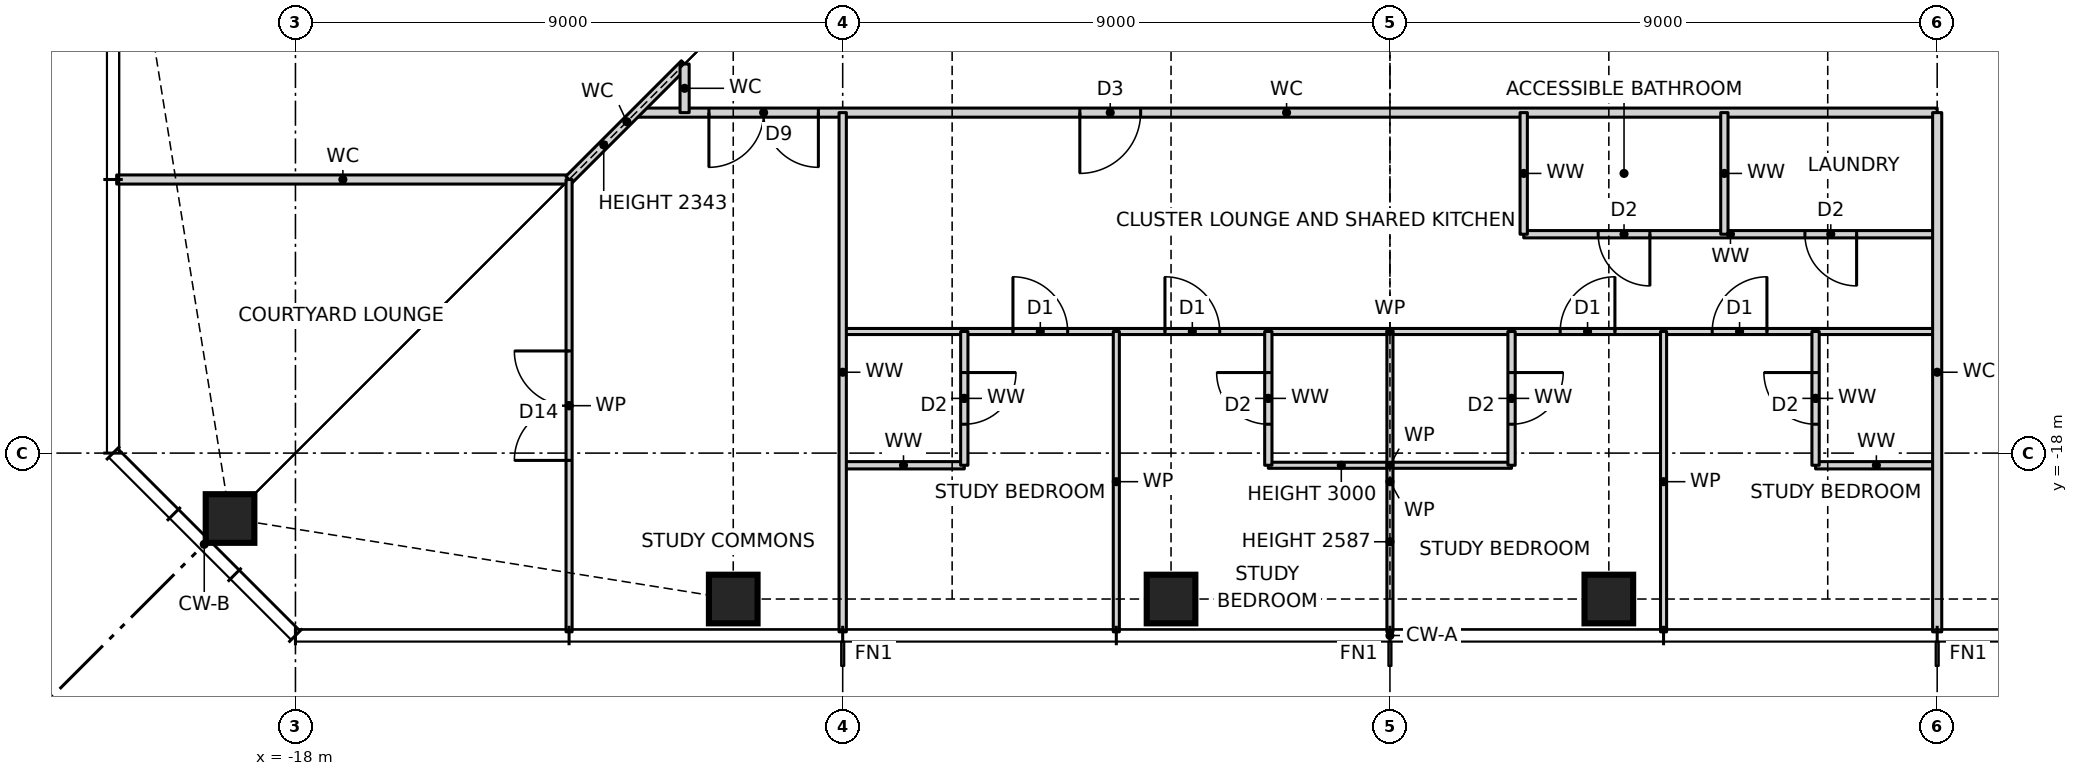
"""IFC4 building model, lengths in metres.
Left out: names, types, materials, properties, quantities, classifications, styles, units other than length and angle.
Written with IfcOpenShell. Run it as: python <this file> out.ifc"""

import sys

from ifc_helpers import new_model, si_unit, direction, frame, frame_2d, origin, origin_2d, place, context, subcontext, project, spatial, rectangle, hollow_rectangle, extrude, element, fill, save


model = new_model("IFC4")
c1 = context("Model", 3, precision=1e-05, world=origin(), true_north=direction((0.0, 1.0)))
c2 = subcontext(c1, "Body", "Model", "MODEL_VIEW")
j1 = project(units=[si_unit("LENGTHUNIT", "METRE"), si_unit("PLANEANGLEUNIT", "RADIAN")], contexts=[c1])
p1 = place(None, origin())
s1 = spatial("IfcSite", under=j1, at=p1, CompositionType="ELEMENT")
p2 = place(p1, origin())
s2 = spatial("IfcBuilding", under=s1, at=p2, CompositionType="ELEMENT")
p3 = place(p2, frame((0.0, 0.0, 84.0)))
s3 = spatial("IfcBuildingStorey", under=s2, at=p3, CompositionType="ELEMENT", Elevation=84.0)
for number, where, z_axis, x_axis in (
    (1, (-19.076, -19.076, 0.0), (0.0, 0.0, 1.0), (1.0, 0.0, 0.0)),
    (2, (-10.8, -20.4, 0.0), (0.0, 0.0, 1.0), (1.0, 0.0, 0.0)),
    (3, (-3.6, -20.4, 0.0), (0.0, 0.0, 1.0), (1.0, 0.0, 0.0)),
    (4, (3.6, -20.4, 0.0), (0.0, 0.0, 1.0), (1.0, 0.0, 0.0)),
):
    element("IfcColumn", number, at=place(p3, frame(where, z_axis=z_axis, x_axis=x_axis)), inside=s3, PredefinedType="COLUMN", context=c2, shape_type="SweptSolid", body=[
        extrude(hollow_rectangle(XDim=0.8, YDim=0.8, WallThickness=0.07, at=origin_2d()), origin(), (0.0, 0.0, 1.0), 3.5),
    ])
p4 = place(p3, frame((-9.0, -18.2, 0.0), z_axis=(0.0, 0.0, 1.0), x_axis=(1.0, 0.0, 0.0)))
e5 = element("IfcWall", 5, at=p4, inside=s3, PredefinedType="PARTITIONING", context=c2, shape_type="SweptSolid", body=[
    extrude(rectangle(XDim=2.0, YDim=0.12, at=frame_2d((1.0, 0.0))), origin(), (0.0, 0.0, 1.0), 3.27),
])
p5 = place(p3, frame((-2.0, -18.2, 0.0), z_axis=(0.0, 0.0, 1.0), x_axis=(1.0, 0.0, 0.0)))
e6 = element("IfcWall", 6, at=p5, inside=s3, PredefinedType="PARTITIONING", context=c2, shape_type="SweptSolid", body=[
    extrude(rectangle(XDim=4.0, YDim=0.1, at=frame_2d((2.0, 0.0))), origin(), (0.0, 0.0, 1.0), 3.0),
])
p6 = place(p3, frame((7.0, -18.2, 0.0), z_axis=(0.0, 0.0, 1.0), x_axis=(1.0, 0.0, 0.0)))
e7 = element("IfcWall", 7, at=p6, inside=s3, PredefinedType="PARTITIONING", context=c2, shape_type="SweptSolid", body=[
    extrude(rectangle(XDim=2.0, YDim=0.12, at=frame_2d((1.0, 0.0))), origin(), (0.0, 0.0, 1.0), 3.27),
])
p7 = place(p3, frame((-9.0, -16.0, 0.0), z_axis=(0.0, 0.0, 1.0), x_axis=(1.0, 0.0, 0.0)))
e8 = element("IfcWall", 8, at=p7, inside=s3, PredefinedType="PARTITIONING", context=c2, shape_type="SweptSolid", body=[
    extrude(rectangle(XDim=18.0, YDim=0.1, at=frame_2d((9.0, 0.0))), origin(), (0.0, 0.0, 1.0), 3.27),
])
p8 = place(p7, frame((2.8, 0.0, 0.0)))
e9 = element("IfcOpeningElement", 9, at=p8, cuts=e8, PredefinedType="OPENING", context=c2, shape_type="SweptSolid", body=[
    extrude(rectangle(XDim=0.9, YDim=2.1, at=frame_2d((0.45, 1.05))), frame((0.0, 0.06, 0.0), z_axis=(0.0, -1.0, 0.0), x_axis=(1.0, 0.0, 0.0)), (0.0, 0.0, 1.0), 0.12),
])
p9 = place(p7, frame((5.3, 0.0, 0.0)))
e10 = element("IfcOpeningElement", 10, at=p9, cuts=e8, PredefinedType="OPENING", context=c2, shape_type="SweptSolid", body=[
    extrude(rectangle(XDim=0.9, YDim=2.1, at=frame_2d((0.45, 1.05))), frame((0.0, 0.06, 0.0), z_axis=(0.0, -1.0, 0.0), x_axis=(1.0, 0.0, 0.0)), (0.0, 0.0, 1.0), 0.12),
])
p10 = place(p7, frame((11.8, 0.0, 0.0)))
e11 = element("IfcOpeningElement", 11, at=p10, cuts=e8, PredefinedType="OPENING", context=c2, shape_type="SweptSolid", body=[
    extrude(rectangle(XDim=0.9, YDim=2.1, at=frame_2d((0.45, 1.05))), frame((0.0, 0.06, 0.0), z_axis=(0.0, -1.0, 0.0), x_axis=(1.0, 0.0, 0.0)), (0.0, 0.0, 1.0), 0.12),
])
p11 = place(p7, frame((14.3, 0.0, 0.0)))
e12 = element("IfcOpeningElement", 12, at=p11, cuts=e8, PredefinedType="OPENING", context=c2, shape_type="SweptSolid", body=[
    extrude(rectangle(XDim=0.9, YDim=2.1, at=frame_2d((0.45, 1.05))), frame((0.0, 0.06, 0.0), z_axis=(0.0, -1.0, 0.0), x_axis=(1.0, 0.0, 0.0)), (0.0, 0.0, 1.0), 0.12),
])
p12 = place(p3, frame((2.2, -14.4, 0.0), z_axis=(0.0, 0.0, 1.0), x_axis=(1.0, 0.0, 0.0)))
e13 = element("IfcWall", 13, at=p12, inside=s3, PredefinedType="PARTITIONING", context=c2, shape_type="SweptSolid", body=[
    extrude(rectangle(XDim=6.8, YDim=0.12, at=frame_2d((3.4, 0.0))), origin(), (0.0, 0.0, 1.0), 3.27),
])
p13 = place(p12, frame((1.225, 0.0, 0.0)))
e14 = element("IfcOpeningElement", 14, at=p13, cuts=e13, PredefinedType="OPENING", context=c2, shape_type="SweptSolid", body=[
    extrude(rectangle(XDim=0.85, YDim=2.1, at=frame_2d((0.425, 1.05))), frame((0.0, 0.07, 0.0), z_axis=(0.0, -1.0, 0.0), x_axis=(1.0, 0.0, 0.0)), (0.0, 0.0, 1.0), 0.14),
])
p14 = place(p12, frame((4.625, 0.0, 0.0)))
e15 = element("IfcOpeningElement", 15, at=p14, cuts=e13, PredefinedType="OPENING", context=c2, shape_type="SweptSolid", body=[
    extrude(rectangle(XDim=0.85, YDim=2.1, at=frame_2d((0.425, 1.05))), frame((0.0, 0.07, 0.0), z_axis=(0.0, -1.0, 0.0), x_axis=(1.0, 0.0, 0.0)), (0.0, 0.0, 1.0), 0.14),
])
p15 = place(p3, frame((-20.94, -13.5, 0.0), z_axis=(0.0, 0.0, 1.0), x_axis=(1.0, 0.0, 0.0)))
e16 = element("IfcWall", 16, at=p15, inside=s3, PredefinedType="PARTITIONING", context=c2, shape_type="SweptSolid", body=[
    extrude(rectangle(XDim=7.44, YDim=0.15, at=frame_2d((3.72, 0.0))), origin(), (0.0, 0.0, 1.0), 3.27),
])
p16 = place(p3, frame((-12.4, -12.4, 0.0), z_axis=(0.0, 0.0, 1.0), x_axis=(1.0, 0.0, 0.0)))
e17 = element("IfcWall", 17, at=p16, inside=s3, PredefinedType="PARTITIONING", context=c2, shape_type="SweptSolid", body=[
    extrude(rectangle(XDim=21.4, YDim=0.15, at=frame_2d((10.7, 0.0))), origin(), (0.0, 0.0, 1.0), 3.27),
])
p17 = place(p16, frame((1.2, 0.0, 0.0)))
e18 = element("IfcOpeningElement", 18, at=p17, cuts=e17, PredefinedType="OPENING", context=c2, shape_type="SweptSolid", body=[
    extrude(rectangle(XDim=1.8, YDim=2.1, at=frame_2d((0.9, 1.05))), frame((0.0, 0.085, 0.0), z_axis=(0.0, -1.0, 0.0), x_axis=(1.0, 0.0, 0.0)), (0.0, 0.0, 1.0), 0.17),
])
p18 = place(p16, frame((7.3, 0.0, 0.0)))
e19 = element("IfcOpeningElement", 19, at=p18, cuts=e17, PredefinedType="OPENING", context=c2, shape_type="SweptSolid", body=[
    extrude(rectangle(XDim=1.0, YDim=2.1, at=frame_2d((0.5, 1.05))), frame((0.0, 0.085, 0.0), z_axis=(0.0, -1.0, 0.0), x_axis=(1.0, 0.0, 0.0)), (0.0, 0.0, 1.0), 0.17),
])
p19 = place(p3, frame((-13.5, -13.5, 0.0), z_axis=(0.0, 0.0, 1.0), x_axis=(0.707106781187, 0.707106781187, 0.0)))
e20 = element("IfcWall", 20, at=p19, inside=s3, PredefinedType="PARTITIONING", context=c2, shape_type="SweptSolid", body=[
    extrude(rectangle(XDim=2.687, YDim=0.15, at=frame_2d((1.343, 0.0))), origin(), (0.0, 0.0, 1.0), 2.343),
])
p20 = place(p3, frame((9.0, -20.94, 0.0), z_axis=(0.0, 0.0, 1.0), x_axis=(0.0, 1.0, 0.0)))
e21 = element("IfcWall", 21, at=p20, inside=s3, PredefinedType="PARTITIONING", context=c2, shape_type="SweptSolid", body=[
    extrude(rectangle(XDim=8.54, YDim=0.15, at=frame_2d((4.27, 0.0))), origin(), (0.0, 0.0, 1.0), 3.27),
])
p21 = place(p3, frame((7.0, -18.2, 0.0), z_axis=(0.0, 0.0, 1.0), x_axis=(0.0, 1.0, 0.0)))
e22 = element("IfcWall", 22, at=p21, inside=s3, PredefinedType="PARTITIONING", context=c2, shape_type="SweptSolid", body=[
    extrude(rectangle(XDim=2.2, YDim=0.12, at=frame_2d((1.1, 0.0))), origin(), (0.0, 0.0, 1.0), 3.27),
])
p22 = place(p21, frame((0.675, 0.0, 0.0)))
e23 = element("IfcOpeningElement", 23, at=p22, cuts=e22, PredefinedType="OPENING", context=c2, shape_type="SweptSolid", body=[
    extrude(rectangle(XDim=0.85, YDim=2.1, at=frame_2d((0.425, 1.05))), frame((0.0, 0.07, 0.0), z_axis=(0.0, -1.0, 0.0), x_axis=(1.0, 0.0, 0.0)), (0.0, 0.0, 1.0), 0.14),
])
p23 = place(p3, frame((5.5, -14.4, 0.0), z_axis=(0.0, 0.0, 1.0), x_axis=(0.0, 1.0, 0.0)))
e24 = element("IfcWall", 24, at=p23, inside=s3, PredefinedType="PARTITIONING", context=c2, shape_type="SweptSolid", body=[
    extrude(rectangle(XDim=2.0, YDim=0.12, at=frame_2d((1.0, 0.0))), origin(), (0.0, 0.0, 1.0), 3.27),
])
p24 = place(p3, frame((4.5, -20.94, 0.0), z_axis=(0.0, 0.0, 1.0), x_axis=(0.0, 1.0, 0.0)))
e25 = element("IfcWall", 25, at=p24, inside=s3, PredefinedType="PARTITIONING", context=c2, shape_type="SweptSolid", body=[
    extrude(rectangle(XDim=4.94, YDim=0.1, at=frame_2d((2.47, 0.0))), origin(), (0.0, 0.0, 1.0), 3.27),
])
p25 = place(p3, frame((2.2, -14.4, 0.0), z_axis=(0.0, 0.0, 1.0), x_axis=(0.0, 1.0, 0.0)))
e26 = element("IfcWall", 26, at=p25, inside=s3, PredefinedType="PARTITIONING", context=c2, shape_type="SweptSolid", body=[
    extrude(rectangle(XDim=2.0, YDim=0.12, at=frame_2d((1.0, 0.0))), origin(), (0.0, 0.0, 1.0), 3.27),
])
p26 = place(p3, frame((2.0, -18.2, 0.0), z_axis=(0.0, 0.0, 1.0), x_axis=(0.0, 1.0, 0.0)))
e27 = element("IfcWall", 27, at=p26, inside=s3, PredefinedType="PARTITIONING", context=c2, shape_type="SweptSolid", body=[
    extrude(rectangle(XDim=2.2, YDim=0.12, at=frame_2d((1.1, 0.0))), origin(), (0.0, 0.0, 1.0), 3.27),
])
p27 = place(p26, frame((0.675, 0.0, 0.0)))
e28 = element("IfcOpeningElement", 28, at=p27, cuts=e27, PredefinedType="OPENING", context=c2, shape_type="SweptSolid", body=[
    extrude(rectangle(XDim=0.85, YDim=2.1, at=frame_2d((0.425, 1.05))), frame((0.0, 0.07, 0.0), z_axis=(0.0, -1.0, 0.0), x_axis=(1.0, 0.0, 0.0)), (0.0, 0.0, 1.0), 0.14),
])
p28 = place(p3, frame((0.0, -20.94, 0.0), z_axis=(0.0, 0.0, 1.0), x_axis=(0.0, 1.0, 0.0)))
e29 = element("IfcWall", 29, at=p28, inside=s3, PredefinedType="PARTITIONING", context=c2, shape_type="SweptSolid", body=[
    extrude(rectangle(XDim=4.94, YDim=0.1, at=frame_2d((2.47, 0.0))), origin(), (0.0, 0.0, 1.0), 2.587),
])
p29 = place(p3, frame((-2.0, -18.2, 0.0), z_axis=(0.0, 0.0, 1.0), x_axis=(0.0, 1.0, 0.0)))
e30 = element("IfcWall", 30, at=p29, inside=s3, PredefinedType="PARTITIONING", context=c2, shape_type="SweptSolid", body=[
    extrude(rectangle(XDim=2.2, YDim=0.12, at=frame_2d((1.1, 0.0))), origin(), (0.0, 0.0, 1.0), 3.27),
])
p30 = place(p29, frame((0.675, 0.0, 0.0)))
e31 = element("IfcOpeningElement", 31, at=p30, cuts=e30, PredefinedType="OPENING", context=c2, shape_type="SweptSolid", body=[
    extrude(rectangle(XDim=0.85, YDim=2.1, at=frame_2d((0.425, 1.05))), frame((0.0, 0.07, 0.0), z_axis=(0.0, -1.0, 0.0), x_axis=(1.0, 0.0, 0.0)), (0.0, 0.0, 1.0), 0.14),
])
p31 = place(p3, frame((-4.5, -20.94, 0.0), z_axis=(0.0, 0.0, 1.0), x_axis=(0.0, 1.0, 0.0)))
e32 = element("IfcWall", 32, at=p31, inside=s3, PredefinedType="PARTITIONING", context=c2, shape_type="SweptSolid", body=[
    extrude(rectangle(XDim=4.94, YDim=0.1, at=frame_2d((2.47, 0.0))), origin(), (0.0, 0.0, 1.0), 3.27),
])
p32 = place(p3, frame((-7.0, -18.2, 0.0), z_axis=(0.0, 0.0, 1.0), x_axis=(0.0, 1.0, 0.0)))
e33 = element("IfcWall", 33, at=p32, inside=s3, PredefinedType="PARTITIONING", context=c2, shape_type="SweptSolid", body=[
    extrude(rectangle(XDim=2.2, YDim=0.12, at=frame_2d((1.1, 0.0))), origin(), (0.0, 0.0, 1.0), 3.27),
])
p33 = place(p32, frame((0.675, 0.0, 0.0)))
e34 = element("IfcOpeningElement", 34, at=p33, cuts=e33, PredefinedType="OPENING", context=c2, shape_type="SweptSolid", body=[
    extrude(rectangle(XDim=0.85, YDim=2.1, at=frame_2d((0.425, 1.05))), frame((0.0, 0.07, 0.0), z_axis=(0.0, -1.0, 0.0), x_axis=(1.0, 0.0, 0.0)), (0.0, 0.0, 1.0), 0.14),
])
p34 = place(p3, frame((-9.0, -20.94, 0.0), z_axis=(0.0, 0.0, 1.0), x_axis=(0.0, 1.0, 0.0)))
e35 = element("IfcWall", 35, at=p34, inside=s3, PredefinedType="PARTITIONING", context=c2, shape_type="SweptSolid", body=[
    extrude(rectangle(XDim=8.54, YDim=0.12, at=frame_2d((4.27, 0.0))), origin(), (0.0, 0.0, 1.0), 3.27),
])
p35 = place(p3, frame((-11.6, -12.4, 0.0), z_axis=(0.0, 0.0, 1.0), x_axis=(0.0, 1.0, 0.0)))
e36 = element("IfcWall", 36, at=p35, inside=s3, PredefinedType="PARTITIONING", context=c2, shape_type="SweptSolid", body=[
    extrude(rectangle(XDim=0.8, YDim=0.15, at=frame_2d((0.4, 0.0))), origin(), (0.0, 0.0, 1.0), 3.27),
])
p36 = place(p3, frame((-13.5, -20.94, 0.0), z_axis=(0.0, 0.0, 1.0), x_axis=(0.0, 1.0, 0.0)))
e37 = element("IfcWall", 37, at=p36, inside=s3, PredefinedType="PARTITIONING", context=c2, shape_type="SweptSolid", body=[
    extrude(rectangle(XDim=7.44, YDim=0.1, at=frame_2d((3.72, 0.0))), origin(), (0.0, 0.0, 1.0), 3.27),
])
p37 = place(p36, frame((2.82, 0.0, 0.0)))
e38 = element("IfcOpeningElement", 38, at=p37, cuts=e37, PredefinedType="OPENING", context=c2, shape_type="SweptSolid", body=[
    extrude(rectangle(XDim=1.8, YDim=2.1, at=frame_2d((0.9, 1.05))), frame((0.0, 0.06, 0.0), z_axis=(0.0, -1.0, 0.0), x_axis=(1.0, 0.0, 0.0)), (0.0, 0.0, 1.0), 0.12),
])
p38 = place(p17, frame((1.8, 0.0, 0.0), z_axis=(0.0, 0.0, 1.0), x_axis=(-1.0, 0.0, 0.0)))
e39 = element("IfcDoor", 39, at=p38, inside=s3, OperationType="DOUBLE_DOOR_SINGLE_SWING", PredefinedType="DOOR", context=c2, shape_type="SweptSolid", body=[
    extrude(rectangle(XDim=1.8, YDim=2.1, at=frame_2d((0.9, 1.05))), frame((0.0, 0.025, 0.0), z_axis=(0.0, -1.0, 0.0), x_axis=(1.0, 0.0, 0.0)), (0.0, 0.0, 1.0), 0.05),
])
fill(e18, e39)
p39 = place(p33, frame((0.85, 0.0, 0.0), z_axis=(0.0, 0.0, 1.0), x_axis=(-1.0, 0.0, 0.0)))
e40 = element("IfcDoor", 40, at=p39, inside=s3, OperationType="SINGLE_SWING_LEFT", PredefinedType="DOOR", context=c2, shape_type="SweptSolid", body=[
    extrude(rectangle(XDim=0.85, YDim=2.1, at=frame_2d((0.425, 1.05))), frame((0.0, 0.025, 0.0), z_axis=(0.0, -1.0, 0.0), x_axis=(1.0, 0.0, 0.0)), (0.0, 0.0, 1.0), 0.05),
])
fill(e34, e40)
p40 = place(p8, origin())
e41 = element("IfcDoor", 41, at=p40, inside=s3, OperationType="SINGLE_SWING_LEFT", PredefinedType="DOOR", context=c2, shape_type="SweptSolid", body=[
    extrude(rectangle(XDim=0.9, YDim=2.1, at=frame_2d((0.45, 1.05))), frame((0.0, 0.025, 0.0), z_axis=(0.0, -1.0, 0.0), x_axis=(1.0, 0.0, 0.0)), (0.0, 0.0, 1.0), 0.05),
])
fill(e9, e41)
p41 = place(p30, origin())
e42 = element("IfcDoor", 42, at=p41, inside=s3, OperationType="SINGLE_SWING_RIGHT", PredefinedType="DOOR", context=c2, shape_type="SweptSolid", body=[
    extrude(rectangle(XDim=0.85, YDim=2.1, at=frame_2d((0.425, 1.05))), frame((0.0, 0.025, 0.0), z_axis=(0.0, -1.0, 0.0), x_axis=(1.0, 0.0, 0.0)), (0.0, 0.0, 1.0), 0.05),
])
fill(e31, e42)
p42 = place(p9, origin())
e43 = element("IfcDoor", 43, at=p42, inside=s3, OperationType="SINGLE_SWING_LEFT", PredefinedType="DOOR", context=c2, shape_type="SweptSolid", body=[
    extrude(rectangle(XDim=0.9, YDim=2.1, at=frame_2d((0.45, 1.05))), frame((0.0, 0.025, 0.0), z_axis=(0.0, -1.0, 0.0), x_axis=(1.0, 0.0, 0.0)), (0.0, 0.0, 1.0), 0.05),
])
fill(e10, e43)
p43 = place(p27, frame((0.85, 0.0, 0.0), z_axis=(0.0, 0.0, 1.0), x_axis=(-1.0, 0.0, 0.0)))
e44 = element("IfcDoor", 44, at=p43, inside=s3, OperationType="SINGLE_SWING_LEFT", PredefinedType="DOOR", context=c2, shape_type="SweptSolid", body=[
    extrude(rectangle(XDim=0.85, YDim=2.1, at=frame_2d((0.425, 1.05))), frame((0.0, 0.025, 0.0), z_axis=(0.0, -1.0, 0.0), x_axis=(1.0, 0.0, 0.0)), (0.0, 0.0, 1.0), 0.05),
])
fill(e28, e44)
p44 = place(p10, origin())
e45 = element("IfcDoor", 45, at=p44, inside=s3, OperationType="SINGLE_SWING_RIGHT", PredefinedType="DOOR", context=c2, shape_type="SweptSolid", body=[
    extrude(rectangle(XDim=0.9, YDim=2.1, at=frame_2d((0.45, 1.05))), frame((0.0, 0.025, 0.0), z_axis=(0.0, -1.0, 0.0), x_axis=(1.0, 0.0, 0.0)), (0.0, 0.0, 1.0), 0.05),
])
fill(e11, e45)
p45 = place(p22, origin())
e46 = element("IfcDoor", 46, at=p45, inside=s3, OperationType="SINGLE_SWING_RIGHT", PredefinedType="DOOR", context=c2, shape_type="SweptSolid", body=[
    extrude(rectangle(XDim=0.85, YDim=2.1, at=frame_2d((0.425, 1.05))), frame((0.0, 0.025, 0.0), z_axis=(0.0, -1.0, 0.0), x_axis=(1.0, 0.0, 0.0)), (0.0, 0.0, 1.0), 0.05),
])
fill(e23, e46)
p46 = place(p11, origin())
e47 = element("IfcDoor", 47, at=p46, inside=s3, OperationType="SINGLE_SWING_RIGHT", PredefinedType="DOOR", context=c2, shape_type="SweptSolid", body=[
    extrude(rectangle(XDim=0.9, YDim=2.1, at=frame_2d((0.45, 1.05))), frame((0.0, 0.025, 0.0), z_axis=(0.0, -1.0, 0.0), x_axis=(1.0, 0.0, 0.0)), (0.0, 0.0, 1.0), 0.05),
])
fill(e12, e47)
p47 = place(p18, frame((1.0, 0.0, 0.0), z_axis=(0.0, 0.0, 1.0), x_axis=(-1.0, 0.0, 0.0)))
e48 = element("IfcDoor", 48, at=p47, inside=s3, OperationType="SINGLE_SWING_RIGHT", PredefinedType="DOOR", context=c2, shape_type="SweptSolid", body=[
    extrude(rectangle(XDim=1.0, YDim=2.1, at=frame_2d((0.5, 1.05))), frame((0.0, 0.025, 0.0), z_axis=(0.0, -1.0, 0.0), x_axis=(1.0, 0.0, 0.0)), (0.0, 0.0, 1.0), 0.05),
])
fill(e19, e48)
p48 = place(p13, frame((0.85, 0.0, 0.0), z_axis=(0.0, 0.0, 1.0), x_axis=(-1.0, 0.0, 0.0)))
e49 = element("IfcDoor", 49, at=p48, inside=s3, OperationType="SINGLE_SWING_LEFT", PredefinedType="DOOR", context=c2, shape_type="SweptSolid", body=[
    extrude(rectangle(XDim=0.85, YDim=2.1, at=frame_2d((0.425, 1.05))), frame((0.0, 0.025, 0.0), z_axis=(0.0, -1.0, 0.0), x_axis=(1.0, 0.0, 0.0)), (0.0, 0.0, 1.0), 0.05),
])
fill(e14, e49)
p49 = place(p14, frame((0.85, 0.0, 0.0), z_axis=(0.0, 0.0, 1.0), x_axis=(-1.0, 0.0, 0.0)))
e50 = element("IfcDoor", 50, at=p49, inside=s3, OperationType="SINGLE_SWING_LEFT", PredefinedType="DOOR", context=c2, shape_type="SweptSolid", body=[
    extrude(rectangle(XDim=0.85, YDim=2.1, at=frame_2d((0.425, 1.05))), frame((0.0, 0.025, 0.0), z_axis=(0.0, -1.0, 0.0), x_axis=(1.0, 0.0, 0.0)), (0.0, 0.0, 1.0), 0.05),
])
fill(e15, e50)
p50 = place(p37, origin())
e51 = element("IfcDoor", 51, at=p50, inside=s3, OperationType="DOUBLE_DOOR_SINGLE_SWING", PredefinedType="DOOR", context=c2, shape_type="SweptSolid", body=[
    extrude(rectangle(XDim=1.8, YDim=2.1, at=frame_2d((0.9, 1.05))), frame((0.0, 0.025, 0.0), z_axis=(0.0, -1.0, 0.0), x_axis=(1.0, 0.0, 0.0)), (0.0, 0.0, 1.0), 0.05),
])
fill(e38, e51)
save(model, sys.argv[1])
